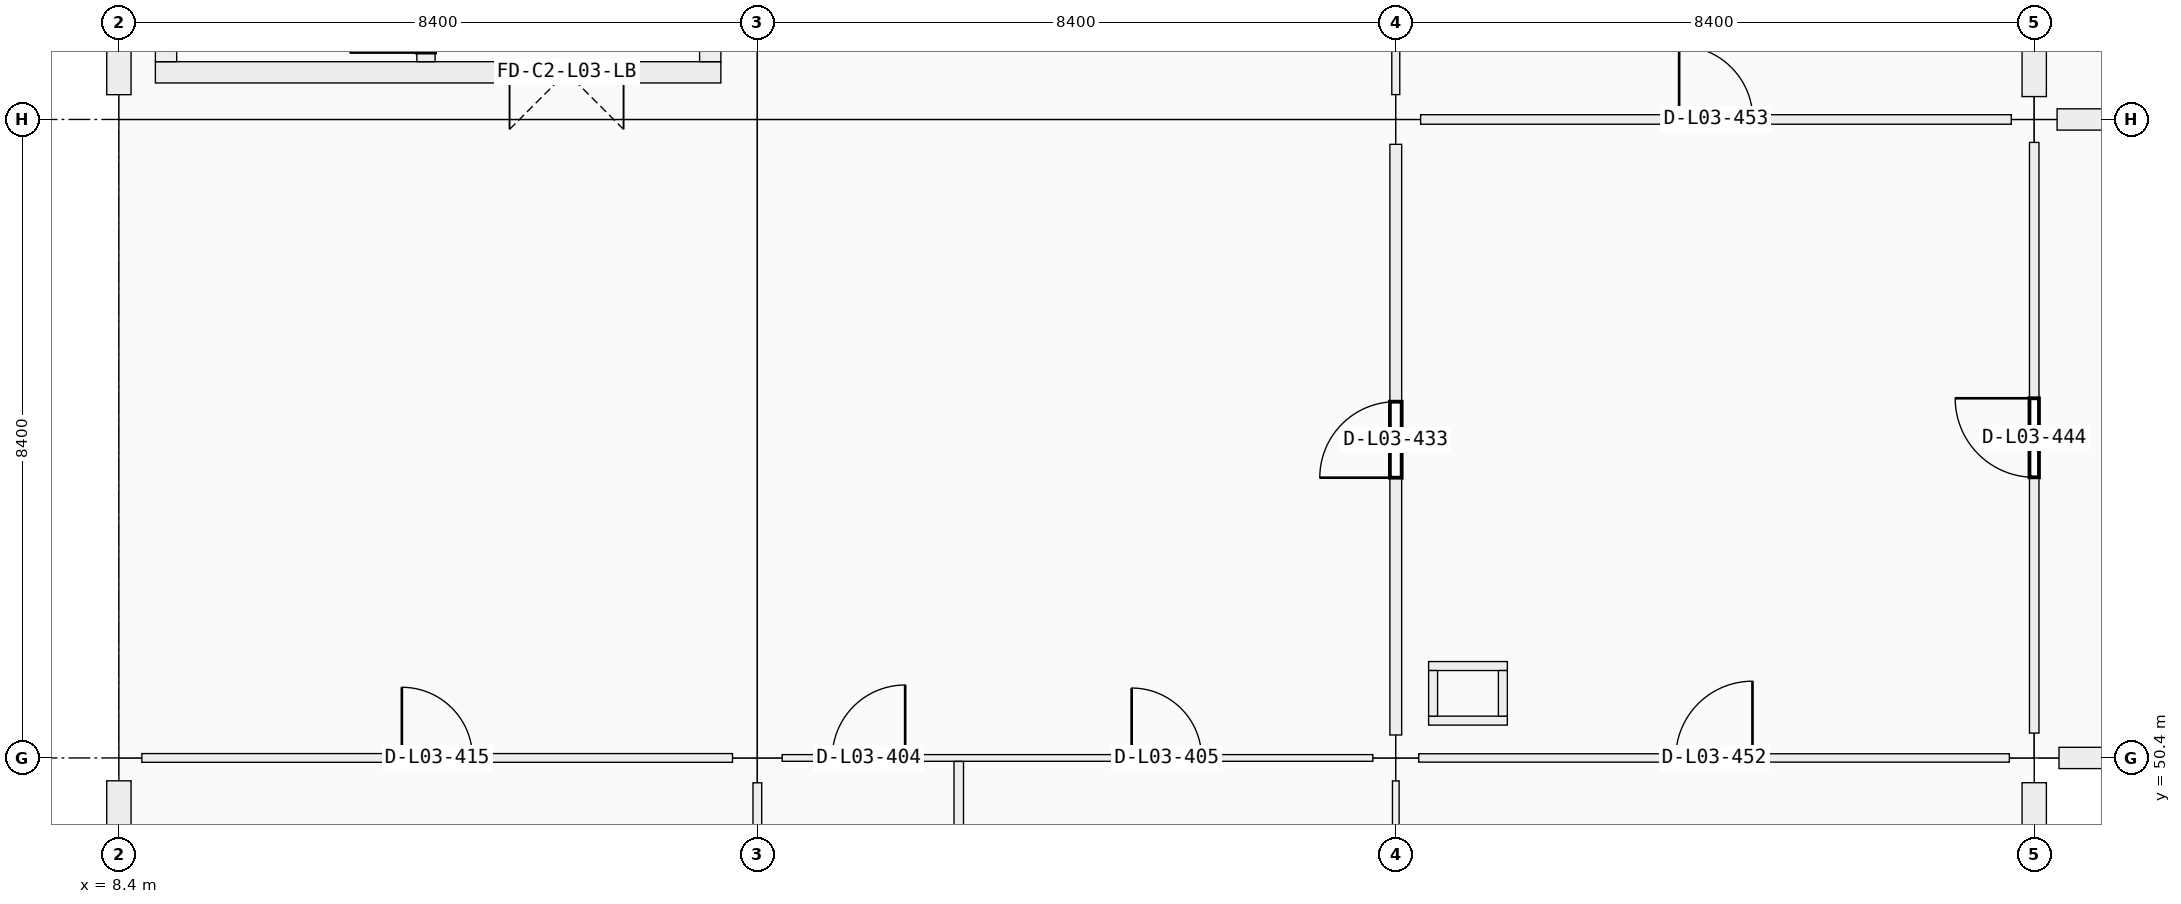
"""IFC4 building model, lengths in metres.
Left out: names, types, materials, properties, quantities, classifications, styles, units other than length and angle.
Written with IfcOpenShell. Run it as: python <this file> out.ifc"""

import sys

from ifc_helpers import new_model, si_unit, direction, frame, frame_2d, origin, origin_2d, place, context, subcontext, project, spatial, rectangle, extrude, element, fill, save


model = new_model("IFC4")
c1 = context("Model", 3, precision=1e-05, world=origin(), true_north=direction((0.0, 1.0)))
c2 = subcontext(c1, "Body", "Model", "MODEL_VIEW")
j1 = project(units=[si_unit("LENGTHUNIT", "METRE"), si_unit("PLANEANGLEUNIT", "RADIAN")], contexts=[c1])
p1 = place(None, origin())
s1 = spatial("IfcSite", under=j1, at=p1, CompositionType="ELEMENT")
p2 = place(p1, origin())
s2 = spatial("IfcBuilding", under=s1, at=p2, CompositionType="ELEMENT")
p3 = place(p2, frame((0.0, 0.0, 14.76)))
s3 = spatial("IfcBuildingStorey", under=s2, at=p3, CompositionType="ELEMENT", Elevation=14.76)
p4 = place(p3, frame((8.4, 50.4, 0.0), z_axis=(0.0, 0.0, 1.0), x_axis=(1.0, 0.0, 0.0)))
e1 = element("IfcColumn", 1, at=p4, inside=s3, PredefinedType="COLUMN", context=c2, shape_type="SweptSolid", body=[
    extrude(rectangle(XDim=0.6, YDim=0.6, at=origin_2d()), origin(), (0.0, 0.0, 1.0), 4.32),
])
for number, where, z_axis, x_axis in (
    (2, (8.4, 58.8, 0.0), (0.0, 0.0, 1.0), (1.0, 0.0, 0.0)),
    (3, (16.8, 50.4, 0.0), (0.0, 0.0, 1.0), (1.0, 0.0, 0.0)),
):
    element("IfcColumn", number, at=place(p3, frame(where, z_axis=z_axis, x_axis=x_axis)), inside=s3, PredefinedType="COLUMN", context=c2, shape_type="SweptSolid", body=[
        extrude(rectangle(XDim=0.65, YDim=0.65, at=origin_2d()), origin(), (0.0, 0.0, 1.0), 4.32),
    ])
for number, where, z_axis, x_axis in (
    (4, (16.8, 58.8, 0.0), (0.0, 0.0, 1.0), (1.0, 0.0, 0.0)),
    (5, (25.2, 50.4, 0.0), (0.0, 0.0, 1.0), (1.0, 0.0, 0.0)),
):
    element("IfcColumn", number, at=place(p3, frame(where, z_axis=z_axis, x_axis=x_axis)), inside=s3, PredefinedType="COLUMN", context=c2, shape_type="SweptSolid", body=[
        extrude(rectangle(XDim=0.6, YDim=0.6, at=origin_2d()), origin(), (0.0, 0.0, 1.0), 4.32),
    ])
for number, where, z_axis, x_axis in (
    (6, (25.2, 58.8, 0.0), (0.0, 0.0, 1.0), (1.0, 0.0, 0.0)),
    (7, (33.6, 50.4, 0.0), (0.0, 0.0, 1.0), (1.0, 0.0, 0.0)),
):
    element("IfcColumn", number, at=place(p3, frame(where, z_axis=z_axis, x_axis=x_axis)), inside=s3, PredefinedType="COLUMN", context=c2, shape_type="SweptSolid", body=[
        extrude(rectangle(XDim=0.65, YDim=0.65, at=origin_2d()), origin(), (0.0, 0.0, 1.0), 4.32),
    ])
p5 = place(p3, frame((33.6, 58.8, 0.0), z_axis=(0.0, 0.0, 1.0), x_axis=(1.0, 0.0, 0.0)))
e8 = element("IfcColumn", 8, at=p5, inside=s3, PredefinedType="COLUMN", context=c2, shape_type="SweptSolid", body=[
    extrude(rectangle(XDim=0.6, YDim=0.6, at=origin_2d()), origin(), (0.0, 0.0, 1.0), 4.32),
])
p6 = place(p3, frame((8.4, 42.326, 0.0), z_axis=(0.0, 0.0, 1.0), x_axis=(0.0, 1.0, 0.0)))
e9 = element("IfcWall", 9, at=p6, inside=s3, PredefinedType="SOLIDWALL", context=c2, shape_type="SweptSolid", body=[
    extrude(rectangle(XDim=7.773, YDim=0.32, at=frame_2d((3.887, 0.0))), origin(), (0.0, 0.0, 1.0), 3.37),
])
p7 = place(p6, frame((2.536, 0.0, 0.9)))
e10 = element("IfcOpeningElement", 10, at=p7, cuts=e9, PredefinedType="OPENING", context=c2, shape_type="SweptSolid", body=[
    extrude(rectangle(XDim=2.7, YDim=1.2, at=frame_2d((1.35, 0.6))), frame((0.0, 0.16, 0.0), z_axis=(0.0, -1.0, 0.0), x_axis=(1.0, 0.0, 0.0)), (0.0, 0.0, 1.0), 0.32),
])
p8 = place(p3, frame((8.4, 59.126, 0.0), z_axis=(0.0, 0.0, 1.0), x_axis=(0.0, 1.0, 0.0)))
e11 = element("IfcWall", 11, at=p8, inside=s3, PredefinedType="SOLIDWALL", context=c2, shape_type="SweptSolid", body=[
    extrude(rectangle(XDim=7.773, YDim=0.32, at=frame_2d((3.886, 0.0))), origin(), (0.0, 0.0, 1.0), 3.37),
])
p9 = place(p3, frame((33.6, 50.074, 0.0), z_axis=(0.0, 0.0, 1.0), x_axis=(0.0, -1.0, 0.0)))
e12 = element("IfcWall", 12, at=p9, inside=s3, PredefinedType="SOLIDWALL", context=c2, shape_type="SweptSolid", body=[
    extrude(rectangle(XDim=7.773, YDim=0.32, at=frame_2d((3.886, 0.0))), origin(), (0.0, 0.0, 1.0), 3.37),
])
p10 = place(p9, frame((3.186, 0.0, 0.9)))
e13 = element("IfcOpeningElement", 13, at=p10, cuts=e12, PredefinedType="OPENING", context=c2, shape_type="SweptSolid", body=[
    extrude(rectangle(XDim=1.4, YDim=1.75, at=frame_2d((0.7, 0.875))), frame((0.0, 0.16, 0.0), z_axis=(0.0, -1.0, 0.0), x_axis=(1.0, 0.0, 0.0)), (0.0, 0.0, 1.0), 0.32),
])
p11 = place(p3, frame((33.6, 66.874, 0.0), z_axis=(0.0, 0.0, 1.0), x_axis=(0.0, -1.0, 0.0)))
e14 = element("IfcWall", 14, at=p11, inside=s3, PredefinedType="SOLIDWALL", context=c2, shape_type="SweptSolid", body=[
    extrude(rectangle(XDim=7.773, YDim=0.32, at=frame_2d((3.886, 0.0))), origin(), (0.0, 0.0, 1.0), 3.37),
])
p12 = place(p11, frame((2.286, 0.0, 0.9)))
e15 = element("IfcOpeningElement", 15, at=p12, cuts=e14, PredefinedType="OPENING", context=c2, shape_type="SweptSolid", body=[
    extrude(rectangle(XDim=3.2, YDim=1.75, at=frame_2d((1.6, 0.875))), frame((0.0, 0.16, 0.0), z_axis=(0.0, -1.0, 0.0), x_axis=(1.0, 0.0, 0.0)), (0.0, 0.0, 1.0), 0.32),
])
p13 = place(p3, frame((41.724, 50.4, 0.0), z_axis=(0.0, 0.0, 1.0), x_axis=(-1.0, 0.0, 0.0)))
e16 = element("IfcWall", 16, at=p13, inside=s3, PredefinedType="SOLIDWALL", context=c2, shape_type="SweptSolid", body=[
    extrude(rectangle(XDim=7.798, YDim=0.28, at=frame_2d((3.899, 0.0))), origin(), (0.0, 0.0, 1.0), 3.37),
])
p14 = place(p3, frame((33.901, 58.8, 0.0), z_axis=(0.0, 0.0, 1.0), x_axis=(1.0, 0.0, 0.0)))
e17 = element("IfcWall", 17, at=p14, inside=s3, PredefinedType="SOLIDWALL", context=c2, shape_type="SweptSolid", body=[
    extrude(rectangle(XDim=7.823, YDim=0.28, at=frame_2d((3.912, 0.0))), origin(), (0.0, 0.0, 1.0), 3.37),
])
p15 = place(p3, frame((16.32, 59.42, 0.0), z_axis=(0.0, 0.0, 1.0), x_axis=(-1.0, 0.0, 0.0)))
e18 = element("IfcWall", 18, at=p15, inside=s3, PredefinedType="SHEAR", context=c2, shape_type="SweptSolid", body=[
    extrude(rectangle(XDim=7.44, YDim=0.28, at=frame_2d((3.72, 0.0))), origin(), (0.0, 0.0, 1.0), 4.32),
])
p16 = place(p15, frame((1.28, 0.0, 0.0)))
e19 = element("IfcOpeningElement", 19, at=p16, cuts=e18, PredefinedType="OPENING", context=c2, shape_type="SweptSolid", body=[
    extrude(rectangle(XDim=1.5, YDim=2.15, at=frame_2d((0.75, 1.075))), frame((0.0, 0.14, 0.0), z_axis=(0.0, -1.0, 0.0), x_axis=(1.0, 0.0, 0.0)), (0.0, 0.0, 1.0), 0.28),
])
for number, where, z_axis, x_axis in (
    (20, (9.02, 59.56, 0.0), (0.0, 0.0, 1.0), (0.0, 1.0, 0.0)),
    (21, (16.18, 66.44, 0.0), (0.0, 0.0, 1.0), (0.0, -1.0, 0.0)),
):
    element("IfcWall", number, at=place(p3, frame(where, z_axis=z_axis, x_axis=x_axis)), inside=s3, PredefinedType="SHEAR", context=c2, shape_type="SweptSolid", body=[
        extrude(rectangle(XDim=6.88, YDim=0.28, at=frame_2d((3.44, 0.0))), origin(), (0.0, 0.0, 1.0), 4.32),
    ])
p17 = place(p3, frame((12.44, 59.56, 0.0), z_axis=(0.0, 0.0, 1.0), x_axis=(0.0, 1.0, 0.0)))
e22 = element("IfcWall", 22, at=p17, inside=s3, PredefinedType="SHEAR", context=c2, shape_type="SweptSolid", body=[
    extrude(rectangle(XDim=6.88, YDim=0.24, at=frame_2d((3.44, 0.0))), origin(), (0.0, 0.0, 1.0), 4.32),
])
p18 = place(p17, frame((0.12, 0.0, 0.0)))
e23 = element("IfcOpeningElement", 23, at=p18, cuts=e22, PredefinedType="OPENING", context=c2, shape_type="SweptSolid", body=[
    extrude(rectangle(XDim=1.0, YDim=2.15, at=frame_2d((0.5, 1.075))), frame((0.0, 0.12, 0.0), z_axis=(0.0, -1.0, 0.0), x_axis=(1.0, 0.0, 0.0)), (0.0, 0.0, 1.0), 0.24),
])
for number, where, z_axis, x_axis in (
    (24, (25.632, 50.891, 0.0), (0.0, 0.0, 1.0), (1.0, 0.0, 0.0)),
    (25, (25.632, 51.609, 0.0), (0.0, 0.0, 1.0), (1.0, 0.0, 0.0)),
):
    element("IfcWall", number, at=place(p3, frame(where, z_axis=z_axis, x_axis=x_axis)), inside=s3, PredefinedType="PARTITIONING", context=c2, shape_type="SweptSolid", body=[
        extrude(rectangle(XDim=1.036, YDim=0.118, at=frame_2d((0.518, 0.0))), origin(), (0.0, 0.0, 1.0), 3.35),
    ])
for number, where, z_axis, x_axis in (
    (26, (25.691, 50.95, 0.0), (0.0, 0.0, 1.0), (0.0, 1.0, 0.0)),
    (27, (26.609, 50.95, 0.0), (0.0, 0.0, 1.0), (0.0, 1.0, 0.0)),
):
    element("IfcWall", number, at=place(p3, frame(where, z_axis=z_axis, x_axis=x_axis)), inside=s3, PredefinedType="PARTITIONING", context=c2, shape_type="SweptSolid", body=[
        extrude(rectangle(XDim=0.6, YDim=0.118, at=frame_2d((0.3, 0.0))), origin(), (0.0, 0.0, 1.0), 3.35),
    ])
p19 = place(p3, frame((8.702, 50.4, 0.0), z_axis=(0.0, 0.0, 1.0), x_axis=(1.0, 0.0, 0.0)))
e28 = element("IfcWall", 28, at=p19, inside=s3, PredefinedType="PARTITIONING", context=c2, shape_type="SweptSolid", body=[
    extrude(rectangle(XDim=7.771, YDim=0.115, at=frame_2d((3.885, 0.0))), origin(), (0.0, 0.0, 1.0), 3.19),
])
p20 = place(p19, frame((3.421, 0.0, 0.0)))
e29 = element("IfcOpeningElement", 29, at=p20, cuts=e28, PredefinedType="OPENING", context=c2, shape_type="SweptSolid", body=[
    extrude(rectangle(XDim=0.93, YDim=2.12, at=frame_2d((0.465, 1.06))), frame((0.0, 0.058, 0.0), z_axis=(0.0, -1.0, 0.0), x_axis=(1.0, 0.0, 0.0)), (0.0, 0.0, 1.0), 0.115),
])
p21 = place(p3, frame((17.127, 50.4, 0.0), z_axis=(0.0, 0.0, 1.0), x_axis=(1.0, 0.0, 0.0)))
e30 = element("IfcWall", 30, at=p21, inside=s3, PredefinedType="PARTITIONING", context=c2, shape_type="SweptSolid", body=[
    extrude(rectangle(XDim=7.771, YDim=0.088, at=frame_2d((3.885, 0.0))), origin(), (0.0, 0.0, 1.0), 3.19),
])
p22 = place(p21, frame((0.658, 0.0, 0.0)))
e31 = element("IfcOpeningElement", 31, at=p22, cuts=e30, PredefinedType="OPENING", context=c2, shape_type="SweptSolid", body=[
    extrude(rectangle(XDim=0.96, YDim=2.1, at=frame_2d((0.48, 1.05))), frame((0.0, 0.044, 0.0), z_axis=(0.0, -1.0, 0.0), x_axis=(1.0, 0.0, 0.0)), (0.0, 0.0, 1.0), 0.088),
])
p23 = place(p21, frame((4.598, 0.0, 0.0)))
e32 = element("IfcOpeningElement", 32, at=p23, cuts=e30, PredefinedType="OPENING", context=c2, shape_type="SweptSolid", body=[
    extrude(rectangle(XDim=0.92, YDim=2.1, at=frame_2d((0.46, 1.05))), frame((0.0, 0.044, 0.0), z_axis=(0.0, -1.0, 0.0), x_axis=(1.0, 0.0, 0.0)), (0.0, 0.0, 1.0), 0.088),
])
p24 = place(p3, frame((25.502, 50.4, 0.0), z_axis=(0.0, 0.0, 1.0), x_axis=(1.0, 0.0, 0.0)))
e33 = element("IfcWall", 33, at=p24, inside=s3, PredefinedType="MOVABLE", context=c2, shape_type="SweptSolid", body=[
    extrude(rectangle(XDim=7.771, YDim=0.11, at=frame_2d((3.885, 0.0))), origin(), (0.0, 0.0, 1.0), 3.19),
])
p25 = place(p24, frame((3.381, 0.0, 0.0)))
e34 = element("IfcOpeningElement", 34, at=p25, cuts=e33, PredefinedType="OPENING", context=c2, shape_type="SweptSolid", body=[
    extrude(rectangle(XDim=1.01, YDim=2.12, at=frame_2d((0.505, 1.06))), frame((0.0, 0.055, 0.0), z_axis=(0.0, -1.0, 0.0), x_axis=(1.0, 0.0, 0.0)), (0.0, 0.0, 1.0), 0.11),
])
p26 = place(p3, frame((25.527, 58.8, 0.0), z_axis=(0.0, 0.0, 1.0), x_axis=(1.0, 0.0, 0.0)))
e35 = element("IfcWall", 35, at=p26, inside=s3, PredefinedType="PARTITIONING", context=c2, shape_type="SweptSolid", body=[
    extrude(rectangle(XDim=7.771, YDim=0.125, at=frame_2d((3.885, 0.0))), origin(), (0.0, 0.0, 1.0), 3.19),
])
p27 = place(p26, frame((3.401, 0.0, 0.0)))
e36 = element("IfcOpeningElement", 36, at=p27, cuts=e35, PredefinedType="OPENING", context=c2, shape_type="SweptSolid", body=[
    extrude(rectangle(XDim=0.97, YDim=2.12, at=frame_2d((0.485, 1.06))), frame((0.0, 0.062, 0.0), z_axis=(0.0, -1.0, 0.0), x_axis=(1.0, 0.0, 0.0)), (0.0, 0.0, 1.0), 0.125),
])
p28 = place(p3, frame((16.8, 42.302, 0.0), z_axis=(0.0, 0.0, 1.0), x_axis=(0.0, 1.0, 0.0)))
e37 = element("IfcWall", 37, at=p28, inside=s3, PredefinedType="PARTITIONING", context=c2, shape_type="SweptSolid", body=[
    extrude(rectangle(XDim=7.771, YDim=0.115, at=frame_2d((3.885, 0.0))), origin(), (0.0, 0.0, 1.0), 3.19),
])
p29 = place(p3, frame((25.2, 42.327, 0.0), z_axis=(0.0, 0.0, 1.0), x_axis=(0.0, 1.0, 0.0)))
e38 = element("IfcWall", 38, at=p29, inside=s3, PredefinedType="PARTITIONING", context=c2, shape_type="SweptSolid", body=[
    extrude(rectangle(XDim=7.771, YDim=0.088, at=frame_2d((3.885, 0.0))), origin(), (0.0, 0.0, 1.0), 3.19),
])
p30 = place(p3, frame((25.2, 50.702, 0.0), z_axis=(0.0, 0.0, 1.0), x_axis=(0.0, 1.0, 0.0)))
e39 = element("IfcWall", 39, at=p30, inside=s3, PredefinedType="PARTITIONING", context=c2, shape_type="SweptSolid", body=[
    extrude(rectangle(XDim=7.771, YDim=0.155, at=frame_2d((3.885, 0.0))), origin(), (0.0, 0.0, 1.0), 3.19),
])
p31 = place(p30, frame((3.385, 0.0, 0.0)))
e40 = element("IfcOpeningElement", 40, at=p31, cuts=e39, PredefinedType="OPENING", context=c2, shape_type="SweptSolid", body=[
    extrude(rectangle(XDim=1.0, YDim=2.2, at=frame_2d((0.5, 1.1))), frame((0.0, 0.078, 0.0), z_axis=(0.0, -1.0, 0.0), x_axis=(1.0, 0.0, 0.0)), (0.0, 0.0, 1.0), 0.155),
])
p32 = place(p3, frame((25.2, 59.127, 0.0), z_axis=(0.0, 0.0, 1.0), x_axis=(0.0, 1.0, 0.0)))
e41 = element("IfcWall", 41, at=p32, inside=s3, PredefinedType="PARTITIONING", context=c2, shape_type="SweptSolid", body=[
    extrude(rectangle(XDim=7.771, YDim=0.105, at=frame_2d((3.885, 0.0))), origin(), (0.0, 0.0, 1.0), 3.19),
])
p33 = place(p32, frame((3.396, 0.0, 0.0)))
e42 = element("IfcOpeningElement", 42, at=p33, cuts=e41, PredefinedType="OPENING", context=c2, shape_type="SweptSolid", body=[
    extrude(rectangle(XDim=0.98, YDim=2.18, at=frame_2d((0.49, 1.09))), frame((0.0, 0.052, 0.0), z_axis=(0.0, -1.0, 0.0), x_axis=(1.0, 0.0, 0.0)), (0.0, 0.0, 1.0), 0.105),
])
p34 = place(p3, frame((33.6, 50.727, 0.0), z_axis=(0.0, 0.0, 1.0), x_axis=(0.0, 1.0, 0.0)))
e43 = element("IfcWall", 43, at=p34, inside=s3, PredefinedType="PARTITIONING", context=c2, shape_type="SweptSolid", body=[
    extrude(rectangle(XDim=7.771, YDim=0.125, at=frame_2d((3.885, 0.0))), origin(), (0.0, 0.0, 1.0), 3.19),
])
p35 = place(p34, frame((3.365, 0.0, 0.0)))
e44 = element("IfcOpeningElement", 44, at=p35, cuts=e43, PredefinedType="OPENING", context=c2, shape_type="SweptSolid", body=[
    extrude(rectangle(XDim=1.04, YDim=2.2, at=frame_2d((0.52, 1.1))), frame((0.0, 0.062, 0.0), z_axis=(0.0, -1.0, 0.0), x_axis=(1.0, 0.0, 0.0)), (0.0, 0.0, 1.0), 0.125),
])
p36 = place(p3, frame((19.45, 42.07, 0.0), z_axis=(0.0, 0.0, 1.0), x_axis=(0.0, 1.0, 0.0)))
e45 = element("IfcWall", 45, at=p36, inside=s3, PredefinedType="PARTITIONING", context=c2, shape_type="SweptSolid", body=[
    extrude(rectangle(XDim=8.284, YDim=0.125, at=frame_2d((4.142, 0.0))), origin(), (0.0, 0.0, 1.0), 3.19),
])
p37 = place(p16, origin())
e46 = element("IfcDoor", 46, at=p37, inside=s3, OperationType="DOUBLE_DOOR_SINGLE_SWING", PredefinedType="DOOR", context=c2, shape_type="SweptSolid", body=[
    extrude(rectangle(XDim=1.5, YDim=2.15, at=frame_2d((0.75, 1.075))), frame((0.0, 0.025, 0.0), z_axis=(0.0, -1.0, 0.0), x_axis=(1.0, 0.0, 0.0)), (0.0, 0.0, 1.0), 0.05),
])
fill(e19, e46)
p38 = place(p22, origin())
e47 = element("IfcDoor", 47, at=p38, inside=s3, OperationType="SINGLE_SWING_RIGHT", PredefinedType="DOOR", context=c2, shape_type="SweptSolid", body=[
    extrude(rectangle(XDim=0.96, YDim=2.1, at=frame_2d((0.48, 1.05))), frame((0.0, 0.025, 0.0), z_axis=(0.0, -1.0, 0.0), x_axis=(1.0, 0.0, 0.0)), (0.0, 0.0, 1.0), 0.05),
])
fill(e31, e47)
p39 = place(p23, origin())
e48 = element("IfcDoor", 48, at=p39, inside=s3, OperationType="SINGLE_SWING_LEFT", PredefinedType="DOOR", context=c2, shape_type="SweptSolid", body=[
    extrude(rectangle(XDim=0.92, YDim=2.1, at=frame_2d((0.46, 1.05))), frame((0.0, 0.025, 0.0), z_axis=(0.0, -1.0, 0.0), x_axis=(1.0, 0.0, 0.0)), (0.0, 0.0, 1.0), 0.05),
])
fill(e32, e48)
p40 = place(p20, origin())
e49 = element("IfcDoor", 49, at=p40, inside=s3, OperationType="SINGLE_SWING_LEFT", PredefinedType="DOOR", context=c2, shape_type="SweptSolid", body=[
    extrude(rectangle(XDim=0.93, YDim=2.12, at=frame_2d((0.465, 1.06))), frame((0.0, 0.025, 0.0), z_axis=(0.0, -1.0, 0.0), x_axis=(1.0, 0.0, 0.0)), (0.0, 0.0, 1.0), 0.05),
])
fill(e29, e49)
p41 = place(p31, origin())
e50 = element("IfcDoor", 50, at=p41, inside=s3, OperationType="SINGLE_SWING_LEFT", PredefinedType="DOOR", context=c2, shape_type="SweptSolid", body=[
    extrude(rectangle(XDim=1.0, YDim=2.2, at=frame_2d((0.5, 1.1))), frame((0.0, 0.025, 0.0), z_axis=(0.0, -1.0, 0.0), x_axis=(1.0, 0.0, 0.0)), (0.0, 0.0, 1.0), 0.05),
])
fill(e40, e50)
p42 = place(p35, origin())
e51 = element("IfcDoor", 51, at=p42, inside=s3, OperationType="SINGLE_SWING_RIGHT", PredefinedType="DOOR", context=c2, shape_type="SweptSolid", body=[
    extrude(rectangle(XDim=1.04, YDim=2.2, at=frame_2d((0.52, 1.1))), frame((0.0, 0.025, 0.0), z_axis=(0.0, -1.0, 0.0), x_axis=(1.0, 0.0, 0.0)), (0.0, 0.0, 1.0), 0.05),
])
fill(e44, e51)
p43 = place(p25, origin())
e52 = element("IfcDoor", 52, at=p43, inside=s3, OperationType="SINGLE_SWING_RIGHT", PredefinedType="DOOR", context=c2, shape_type="SweptSolid", body=[
    extrude(rectangle(XDim=1.01, YDim=2.12, at=frame_2d((0.505, 1.06))), frame((0.0, 0.025, 0.0), z_axis=(0.0, -1.0, 0.0), x_axis=(1.0, 0.0, 0.0)), (0.0, 0.0, 1.0), 0.05),
])
fill(e34, e52)
p44 = place(p27, origin())
e53 = element("IfcDoor", 53, at=p44, inside=s3, OperationType="SINGLE_SWING_LEFT", PredefinedType="DOOR", context=c2, shape_type="SweptSolid", body=[
    extrude(rectangle(XDim=0.97, YDim=2.12, at=frame_2d((0.485, 1.06))), frame((0.0, 0.025, 0.0), z_axis=(0.0, -1.0, 0.0), x_axis=(1.0, 0.0, 0.0)), (0.0, 0.0, 1.0), 0.05),
])
fill(e36, e53)
save(model, sys.argv[1])
